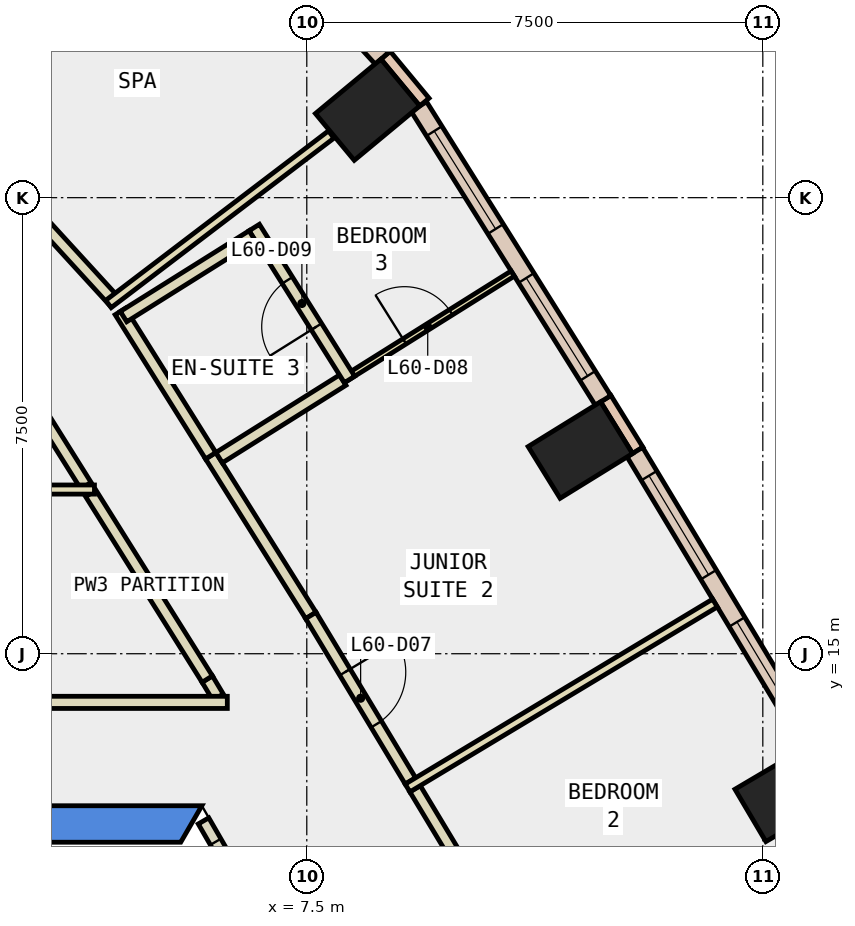
"""IFC4 building model, lengths in metres.
Left out: names, types, materials, properties, quantities, classifications, styles, units other than length and angle.
Written with IfcOpenShell. Run it as: python <this file> out.ifc"""

import sys

from ifc_helpers import new_model, si_unit, direction, frame, frame_2d, origin, origin_2d, place, context, subcontext, project, spatial, polyline, rectangle, outline, extrude, element, fill, save


model = new_model("IFC4")
c1 = context("Model", 3, precision=1e-05, world=origin(), true_north=direction((0.0, 1.0)))
c2 = subcontext(c1, "Body", "Model", "MODEL_VIEW")
j1 = project(units=[si_unit("LENGTHUNIT", "METRE"), si_unit("PLANEANGLEUNIT", "RADIAN")], contexts=[c1])
p1 = place(None, origin())
s1 = spatial("IfcSite", under=j1, at=p1, CompositionType="ELEMENT")
p2 = place(p1, origin())
s2 = spatial("IfcBuilding", under=s1, at=p2, CompositionType="ELEMENT")
p3 = place(p2, frame((0.0, 0.0, 263.0)))
s3 = spatial("IfcBuildingStorey", under=s2, at=p3, CompositionType="ELEMENT", Elevation=263.0)
for number, where, z_axis, x_axis in (
    (1, (15.399, 12.697, -0.34), (0.0, 0.0, 1.0), (-0.509, 0.861, 0.0)),
    (2, (11.999, 18.349, -0.34), (0.0, 0.0, 1.0), (-0.526, 0.851, 0.0)),
    (3, (8.5, 23.946, -0.34), (0.0, 0.0, 1.0), (-0.639, 0.769, 0.0)),
):
    element("IfcColumn", number, at=place(p3, frame(where, z_axis=z_axis, x_axis=x_axis)), inside=s3, PredefinedType="COLUMN", context=c2, shape_type="SweptSolid", body=[
        extrude(rectangle(XDim=1.0, YDim=1.4, at=origin_2d()), origin(), (0.0, 0.0, 1.0), 3.6),
    ])
p4 = place(p3, frame((0.0, 0.0, -0.34)))
e4 = element("IfcWall", 4, at=p4, inside=s3, PredefinedType="SHEAR", context=c2, shape_type="SweptSolid", body=[
    extrude(outline(polyline([(5.774, 12.5), (-5.774, 12.5), (-5.427, 11.9), (5.427, 11.9), (5.774, 12.5)])), origin(), (0.0, 0.0, 1.0), 3.6),
])
p5 = place(p3, frame((12.943, 18.344, 0.0), z_axis=(0.0, 0.0, 1.0), x_axis=(-0.525825307325, 0.850592585306, 0.0)))
e5 = element("IfcWall", 5, at=p5, inside=s3, PredefinedType="STANDARD", context=c2, shape_type="SweptSolid", body=[
    extrude(rectangle(XDim=1.0, YDim=0.2, at=frame_2d((0.5, 0.0))), origin(), (0.0, 0.0, 1.0), 3.26),
])
p6 = place(p3, frame((9.434, 24.072, 0.0), z_axis=(0.0, 0.0, 1.0), x_axis=(-0.638117112481, 0.769939316283, 0.0)))
e6 = element("IfcWall", 6, at=p6, inside=s3, PredefinedType="STANDARD", context=c2, shape_type="SweptSolid", body=[
    extrude(rectangle(XDim=1.0, YDim=0.2, at=frame_2d((0.5, 0.0))), origin(), (0.0, 0.0, 1.0), 3.26),
])
p7 = place(p3, frame((15.788, 13.506, 0.0), z_axis=(0.0, 0.0, 1.0), x_axis=(-0.515435742129, 0.856928232547, 0.0)))
e7 = element("IfcWall", 7, at=p7, inside=s3, PredefinedType="STANDARD", context=c2, shape_type="SweptSolid", body=[
    extrude(rectangle(XDim=5.613, YDim=0.3, at=frame_2d((2.806, 0.0))), origin(), (0.0, 0.0, 1.0), 3.26),
])
p8 = place(p7, frame((0.453, 0.0, 0.9)))
e8 = element("IfcOpeningElement", 8, at=p8, cuts=e7, PredefinedType="OPENING", context=c2, shape_type="SweptSolid", body=[
    extrude(rectangle(XDim=1.9, YDim=2.0, at=frame_2d((0.95, 1.0))), frame((0.0, 0.16, 0.0), z_axis=(0.0, -1.0, 0.0), x_axis=(1.0, 0.0, 0.0)), (0.0, 0.0, 1.0), 0.32),
])
p9 = place(p7, frame((3.26, 0.0, 0.9)))
e9 = element("IfcOpeningElement", 9, at=p9, cuts=e7, PredefinedType="OPENING", context=c2, shape_type="SweptSolid", body=[
    extrude(rectangle(XDim=1.9, YDim=2.0, at=frame_2d((0.95, 1.0))), frame((0.0, 0.16, 0.0), z_axis=(0.0, -1.0, 0.0), x_axis=(1.0, 0.0, 0.0)), (0.0, 0.0, 1.0), 0.32),
])
p10 = place(p3, frame((12.372, 19.166, 0.0), z_axis=(0.0, 0.0, 1.0), x_axis=(-0.531137483242, 0.847285650708, 0.0)))
e10 = element("IfcWall", 10, at=p10, inside=s3, PredefinedType="STANDARD", context=c2, shape_type="SweptSolid", body=[
    extrude(rectangle(XDim=5.703, YDim=0.3, at=frame_2d((2.852, 0.0))), origin(), (0.0, 0.0, 1.0), 3.26),
])
p11 = place(p10, frame((0.476, 0.0, 0.9)))
e11 = element("IfcOpeningElement", 11, at=p11, cuts=e10, PredefinedType="OPENING", context=c2, shape_type="SweptSolid", body=[
    extrude(rectangle(XDim=1.9, YDim=2.0, at=frame_2d((0.95, 1.0))), frame((0.0, 0.16, 0.0), z_axis=(0.0, -1.0, 0.0), x_axis=(1.0, 0.0, 0.0)), (0.0, 0.0, 1.0), 0.32),
])
p12 = place(p10, frame((3.327, 0.0, 0.9)))
e12 = element("IfcOpeningElement", 12, at=p12, cuts=e10, PredefinedType="OPENING", context=c2, shape_type="SweptSolid", body=[
    extrude(rectangle(XDim=1.9, YDim=2.0, at=frame_2d((0.95, 1.0))), frame((0.0, 0.16, 0.0), z_axis=(0.0, -1.0, 0.0), x_axis=(1.0, 0.0, 0.0)), (0.0, 0.0, 1.0), 0.32),
])
p13 = place(p3, frame((8.739, 24.794, 0.0), z_axis=(0.0, 0.0, 1.0), x_axis=(-0.675143863554, 0.737686087374, 0.0)))
e13 = element("IfcWall", 13, at=p13, inside=s3, PredefinedType="STANDARD", context=c2, shape_type="SweptSolid", body=[
    extrude(rectangle(XDim=4.38, YDim=0.3, at=frame_2d((2.19, 0.0))), origin(), (0.0, 0.0, 1.0), 3.26),
])
p14 = place(p13, frame((1.49, 0.0, 0.9)))
e14 = element("IfcOpeningElement", 14, at=p14, cuts=e13, PredefinedType="OPENING", context=c2, shape_type="SweptSolid", body=[
    extrude(rectangle(XDim=1.4, YDim=2.0, at=frame_2d((0.7, 1.0))), frame((0.0, 0.16, 0.0), z_axis=(0.0, -1.0, 0.0), x_axis=(1.0, 0.0, 0.0)), (0.0, 0.0, 1.0), 0.32),
])
p15 = place(p3, frame((6.041, 14.286, 0.0), z_axis=(0.0, 0.0, 1.0), x_axis=(-0.513873647624, 0.857865883619, 0.0)))
e15 = element("IfcWall", 15, at=p15, inside=s3, PredefinedType="PARTITIONING", context=c2, shape_type="SweptSolid", body=[
    extrude(rectangle(XDim=0.346, YDim=0.2, at=frame_2d((0.173, 0.0))), origin(), (0.0, 0.0, 1.0), 3.26),
])
p16 = place(p3, frame((5.863, 14.583, 0.0), z_axis=(0.0, 0.0, 1.0), x_axis=(-0.531380509042, 0.847133256702, 0.0)))
e16 = element("IfcWall", 16, at=p16, inside=s3, PredefinedType="PARTITIONING", context=c2, shape_type="SweptSolid", body=[
    extrude(rectangle(XDim=3.604, YDim=0.2, at=frame_2d((1.802, 0.0))), origin(), (0.0, 0.0, 1.0), 3.26),
])
p17 = place(p3, frame((3.868, 17.764, 0.0), z_axis=(0.0, 0.0, 1.0), x_axis=(-0.531062870102, 0.847332418829, 0.0)))
e17 = element("IfcWall", 17, at=p17, inside=s3, PredefinedType="PARTITIONING", context=c2, shape_type="SweptSolid", body=[
    extrude(rectangle(XDim=2.062, YDim=0.2, at=frame_2d((1.031, 0.0))), origin(), (0.0, 0.0, 1.0), 3.26),
])
p18 = place(p3, frame((9.281, 12.779, 0.0), z_axis=(0.0, 0.0, 1.0), x_axis=(0.515568955032, -0.856848091908, 0.0)))
e18 = element("IfcWall", 18, at=p18, inside=s3, PredefinedType="PARTITIONING", context=c2, shape_type="SweptSolid", body=[
    extrude(rectangle(XDim=3.177, YDim=0.2, at=frame_2d((1.588, 0.0))), origin(), (0.0, 0.0, 1.0), 3.26),
])
p19 = place(p3, frame((5.92, 18.256, 0.0), z_axis=(0.0, 0.0, 1.0), x_axis=(0.531152062518, -0.84727651123, 0.0)))
e19 = element("IfcWall", 19, at=p19, inside=s3, PredefinedType="PARTITIONING", context=c2, shape_type="SweptSolid", body=[
    extrude(rectangle(XDim=3.101, YDim=0.2, at=frame_2d((1.55, 0.0))), origin(), (0.0, 0.0, 1.0), 3.26),
])
p20 = place(p3, frame((7.567, 15.629, 0.0), z_axis=(0.0, 0.0, 1.0), x_axis=(0.51556943596, -0.856847802532, 0.0)))
e20 = element("IfcWall", 20, at=p20, inside=s3, PredefinedType="PARTITIONING", context=c2, shape_type="SweptSolid", body=[
    extrude(rectangle(XDim=3.176, YDim=0.2, at=frame_2d((1.588, 0.0))), origin(), (0.0, 0.0, 1.0), 3.26),
])
p21 = place(p20, frame((1.088, 0.0, 0.0)))
e21 = element("IfcOpeningElement", 21, at=p21, cuts=e20, PredefinedType="OPENING", context=c2, shape_type="SweptSolid", body=[
    extrude(rectangle(XDim=1.0, YDim=2.1, at=frame_2d((0.5, 1.05))), frame((0.0, 0.11, 0.0), z_axis=(0.0, -1.0, 0.0), x_axis=(1.0, 0.0, 0.0)), (0.0, 0.0, 1.0), 0.22),
])
p22 = place(p3, frame((4.433, 20.628, 0.0), z_axis=(0.0, 0.0, 1.0), x_axis=(0.531135189756, -0.84728708842, 0.0)))
e22 = element("IfcWall", 22, at=p22, inside=s3, PredefinedType="PARTITIONING", context=c2, shape_type="SweptSolid", body=[
    extrude(rectangle(XDim=2.799, YDim=0.2, at=frame_2d((1.4, 0.0))), origin(), (0.0, 0.0, 1.0), 3.26),
])
p23 = place(p3, frame((2.084, 23.253, 0.0), z_axis=(0.0, 0.0, 1.0), x_axis=(0.675074517272, -0.737749548377, 0.0)))
e23 = element("IfcWall", 23, at=p23, inside=s3, PredefinedType="PARTITIONING", context=c2, shape_type="SweptSolid", body=[
    extrude(rectangle(XDim=3.334, YDim=0.2, at=frame_2d((1.667, 0.0))), origin(), (0.0, 0.0, 1.0), 3.26),
])
p24 = place(p3, frame((9.157, 12.792, 0.0), z_axis=(0.0, 0.0, 1.0), x_axis=(0.856933793276, 0.515426497129, 0.0)))
e24 = element("IfcWall", 24, at=p24, inside=s3, PredefinedType="PARTITIONING", context=c2, shape_type="SweptSolid", body=[
    extrude(rectangle(XDim=5.9, YDim=0.15, at=frame_2d((2.95, 0.0))), origin(), (0.0, 0.0, 1.0), 3.26),
])
p25 = place(p3, frame((8.091, 19.499, 0.0), z_axis=(0.0, 0.0, 1.0), x_axis=(0.847249319986, 0.53119543464, 0.0)))
e25 = element("IfcWall", 25, at=p25, inside=s3, PredefinedType="PARTITIONING", context=c2, shape_type="SweptSolid", body=[
    extrude(rectangle(XDim=3.3, YDim=0.1, at=frame_2d((1.65, 0.0))), origin(), (0.0, 0.0, 1.0), 3.26),
])
p26 = place(p25, frame((1.2, 0.0, 0.0)))
e26 = element("IfcOpeningElement", 26, at=p26, cuts=e25, PredefinedType="OPENING", context=c2, shape_type="SweptSolid", body=[
    extrude(rectangle(XDim=0.9, YDim=2.1, at=frame_2d((0.45, 1.05))), frame((0.0, 0.06, 0.0), z_axis=(0.0, -1.0, 0.0), x_axis=(1.0, 0.0, 0.0)), (0.0, 0.0, 1.0), 0.12),
])
p27 = place(p3, frame((6.058, 18.224, 0.0), z_axis=(0.0, 0.0, 1.0), x_axis=(0.847191403331, 0.531287799711, 0.0)))
e27 = element("IfcWall", 27, at=p27, inside=s3, PredefinedType="PARTITIONING", context=c2, shape_type="SweptSolid", body=[
    extrude(rectangle(XDim=2.4, YDim=0.2, at=frame_2d((1.2, 0.0))), origin(), (0.0, 0.0, 1.0), 3.26),
])
p28 = place(p3, frame((8.203, 19.51, 0.0), z_axis=(0.0, 0.0, 1.0), x_axis=(-0.531218552952, 0.847234825181, 0.0)))
e28 = element("IfcWall", 28, at=p28, inside=s3, PredefinedType="PARTITIONING", context=c2, shape_type="SweptSolid", body=[
    extrude(rectangle(XDim=2.95, YDim=0.2, at=frame_2d((1.475, 0.0))), origin(), (0.0, 0.0, 1.0), 3.26),
])
p29 = place(p28, frame((1.025, 0.0, 0.0)))
e29 = element("IfcOpeningElement", 29, at=p29, cuts=e28, PredefinedType="OPENING", context=c2, shape_type="SweptSolid", body=[
    extrude(rectangle(XDim=0.9, YDim=2.1, at=frame_2d((0.45, 1.05))), frame((0.0, 0.11, 0.0), z_axis=(0.0, -1.0, 0.0), x_axis=(1.0, 0.0, 0.0)), (0.0, 0.0, 1.0), 0.22),
])
p30 = place(p3, frame((6.604, 21.871, 0.0), z_axis=(0.0, 0.0, 1.0), x_axis=(-0.847377617561, -0.530990746866, 0.0)))
e30 = element("IfcWall", 30, at=p30, inside=s3, PredefinedType="PARTITIONING", context=c2, shape_type="SweptSolid", body=[
    extrude(rectangle(XDim=2.499, YDim=0.2, at=frame_2d((1.25, 0.0))), origin(), (0.0, 0.0, 1.0), 3.26),
])
p31 = place(p3, frame((4.238, 20.751, 0.0), z_axis=(0.0, 0.0, 1.0), x_axis=(0.795806473987, 0.605551034976, 0.0)))
e31 = element("IfcWall", 31, at=p31, inside=s3, PredefinedType="PARTITIONING", context=c2, shape_type="SweptSolid", body=[
    extrude(rectangle(XDim=4.604, YDim=0.15, at=frame_2d((2.302, 0.0))), origin(), (0.0, 0.0, 1.0), 3.26),
])
p32 = place(p3, frame((6.699, 10.697, 0.0), z_axis=(0.0, 0.0, 1.0), x_axis=(-0.499914839587, 0.866074565589, 0.0)))
e32 = element("IfcWall", 32, at=p32, inside=s3, PredefinedType="PARTITIONING", context=c2, shape_type="SweptSolid", body=[
    extrude(rectangle(XDim=1.794, YDim=0.2, at=frame_2d((0.897, 0.0))), origin(), (0.0, 0.0, 1.0), 2.4),
])
p33 = place(p32, frame((0.397, 0.0, 0.0)))
e33 = element("IfcOpeningElement", 33, at=p33, cuts=e32, PredefinedType="OPENING", context=c2, shape_type="SweptSolid", body=[
    extrude(rectangle(XDim=1.0, YDim=2.1, at=frame_2d((0.5, 1.05))), frame((0.0, 0.11, 0.0), z_axis=(0.0, -1.0, 0.0), x_axis=(1.0, 0.0, 0.0)), (0.0, 0.0, 1.0), 0.22),
])
p34 = place(p3, frame((0.4, 14.2, 0.0), z_axis=(0.0, 0.0, 1.0), x_axis=(1.0, 0.0, 0.0)))
e34 = element("IfcWall", 34, at=p34, inside=s3, PredefinedType="PARTITIONING", context=c2, shape_type="SweptSolid", body=[
    extrude(rectangle(XDim=5.793, YDim=0.2, at=frame_2d((2.896, 0.0))), origin(), (0.0, 0.0, 1.0), 3.26),
])
p35 = place(p34, frame((0.095, 0.0, 0.0)))
e35 = element("IfcOpeningElement", 35, at=p35, cuts=e34, PredefinedType="OPENING", context=c2, shape_type="SweptSolid", body=[
    extrude(rectangle(XDim=1.0, YDim=2.1, at=frame_2d((0.5, 1.05))), frame((0.0, 0.11, 0.0), z_axis=(0.0, -1.0, 0.0), x_axis=(1.0, 0.0, 0.0)), (0.0, 0.0, 1.0), 0.22),
])
p36 = place(p3, frame((0.4, 17.7, 0.0), z_axis=(0.0, 0.0, 1.0), x_axis=(1.0, 0.0, 0.0)))
e36 = element("IfcWall", 36, at=p36, inside=s3, PredefinedType="PARTITIONING", context=c2, shape_type="SweptSolid", body=[
    extrude(rectangle(XDim=3.608, YDim=0.15, at=frame_2d((1.804, 0.0))), origin(), (0.0, 0.0, 1.0), 3.26),
])
p37 = place(p8, origin())
e37 = element("IfcWindow", 37, at=p37, inside=s3, PartitioningType="SINGLE_PANEL", PredefinedType="WINDOW", context=c2, shape_type="SweptSolid", body=[
    extrude(rectangle(XDim=1.9, YDim=2.0, at=frame_2d((0.95, 1.0))), frame((0.0, 0.03, 0.0), z_axis=(0.0, -1.0, 0.0), x_axis=(1.0, 0.0, 0.0)), (0.0, 0.0, 1.0), 0.06),
])
fill(e8, e37)
p38 = place(p9, origin())
e38 = element("IfcWindow", 38, at=p38, inside=s3, PartitioningType="SINGLE_PANEL", PredefinedType="WINDOW", context=c2, shape_type="SweptSolid", body=[
    extrude(rectangle(XDim=1.9, YDim=2.0, at=frame_2d((0.95, 1.0))), frame((0.0, 0.03, 0.0), z_axis=(0.0, -1.0, 0.0), x_axis=(1.0, 0.0, 0.0)), (0.0, 0.0, 1.0), 0.06),
])
fill(e9, e38)
p39 = place(p11, origin())
e39 = element("IfcWindow", 39, at=p39, inside=s3, PartitioningType="SINGLE_PANEL", PredefinedType="WINDOW", context=c2, shape_type="SweptSolid", body=[
    extrude(rectangle(XDim=1.9, YDim=2.0, at=frame_2d((0.95, 1.0))), frame((0.0, 0.03, 0.0), z_axis=(0.0, -1.0, 0.0), x_axis=(1.0, 0.0, 0.0)), (0.0, 0.0, 1.0), 0.06),
])
fill(e11, e39)
p40 = place(p12, origin())
e40 = element("IfcWindow", 40, at=p40, inside=s3, PartitioningType="SINGLE_PANEL", PredefinedType="WINDOW", context=c2, shape_type="SweptSolid", body=[
    extrude(rectangle(XDim=1.9, YDim=2.0, at=frame_2d((0.95, 1.0))), frame((0.0, 0.03, 0.0), z_axis=(0.0, -1.0, 0.0), x_axis=(1.0, 0.0, 0.0)), (0.0, 0.0, 1.0), 0.06),
])
fill(e12, e40)
p41 = place(p21, origin())
e41 = element("IfcDoor", 41, at=p41, inside=s3, OperationType="SINGLE_SWING_RIGHT", PredefinedType="DOOR", context=c2, shape_type="SweptSolid", body=[
    extrude(rectangle(XDim=1.0, YDim=2.1, at=frame_2d((0.5, 1.05))), frame((0.0, 0.025, 0.0), z_axis=(0.0, -1.0, 0.0), x_axis=(1.0, 0.0, 0.0)), (0.0, 0.0, 1.0), 0.05),
])
fill(e21, e41)
p42 = place(p26, origin())
e42 = element("IfcDoor", 42, at=p42, inside=s3, OperationType="SINGLE_SWING_LEFT", PredefinedType="DOOR", context=c2, shape_type="SweptSolid", body=[
    extrude(rectangle(XDim=0.9, YDim=2.1, at=frame_2d((0.45, 1.05))), frame((0.0, 0.025, 0.0), z_axis=(0.0, -1.0, 0.0), x_axis=(1.0, 0.0, 0.0)), (0.0, 0.0, 1.0), 0.05),
])
fill(e26, e42)
p43 = place(p29, origin())
e43 = element("IfcDoor", 43, at=p43, inside=s3, OperationType="SINGLE_SWING_RIGHT", PredefinedType="DOOR", context=c2, shape_type="SweptSolid", body=[
    extrude(rectangle(XDim=0.9, YDim=2.1, at=frame_2d((0.45, 1.05))), frame((0.0, 0.025, 0.0), z_axis=(0.0, -1.0, 0.0), x_axis=(1.0, 0.0, 0.0)), (0.0, 0.0, 1.0), 0.05),
])
fill(e29, e43)
p44 = place(p33, origin())
e44 = element("IfcDoor", 44, at=p44, inside=s3, OperationType="SINGLE_SWING_LEFT", PredefinedType="DOOR", context=c2, shape_type="SweptSolid", body=[
    extrude(rectangle(XDim=1.0, YDim=2.1, at=frame_2d((0.5, 1.05))), frame((0.0, 0.025, 0.0), z_axis=(0.0, -1.0, 0.0), x_axis=(1.0, 0.0, 0.0)), (0.0, 0.0, 1.0), 0.05),
])
fill(e33, e44)
save(model, sys.argv[1])
